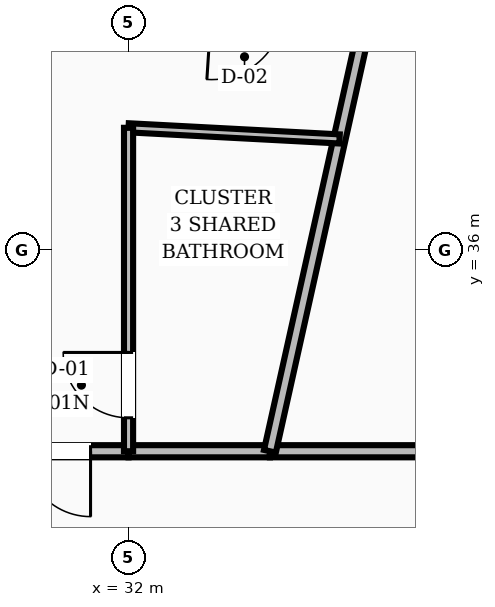
"""IFC4 building model, lengths in metres.
Left out: names, types, materials, properties, quantities, classifications, styles, units other than length and angle.
Written with IfcOpenShell. Run it as: python <this file> out.ifc"""

import sys

from ifc_helpers import new_model, si_unit, direction, frame, frame_2d, origin, place, context, subcontext, project, spatial, rectangle, extrude, element, fill, save


model = new_model("IFC4")
c1 = context("Model", 3, precision=1e-05, world=origin(), true_north=direction((0.0, 1.0)))
c2 = subcontext(c1, "Body", "Model", "MODEL_VIEW")
j1 = project(units=[si_unit("LENGTHUNIT", "METRE"), si_unit("PLANEANGLEUNIT", "RADIAN")], contexts=[c1])
p1 = place(None, origin())
s1 = spatial("IfcSite", under=j1, at=p1, CompositionType="ELEMENT")
p2 = place(p1, origin())
s2 = spatial("IfcBuilding", under=s1, at=p2, CompositionType="ELEMENT")
p3 = place(p2, frame((0.0, 0.0, 229.2)))
s3 = spatial("IfcBuildingStorey", under=s2, at=p3, CompositionType="ELEMENT", Elevation=229.2)
p4 = place(p3, frame((35.873, 33.35, 0.0), z_axis=(0.0, 0.0, 1.0), x_axis=(-1.0, 0.0, 0.0)))
e1 = element("IfcWall", 1, at=p4, inside=s3, PredefinedType="SOLIDWALL", context=c2, shape_type="SweptSolid", body=[
    extrude(rectangle(XDim=2.013, YDim=0.16, at=frame_2d((1.006, 0.0))), origin(), (0.0, 0.0, 1.0), 2.87),
])
p5 = place(p3, frame((33.86, 33.35, 0.0), z_axis=(0.0, 0.0, 1.0), x_axis=(-1.0, 0.0, 0.0)))
e2 = element("IfcWall", 2, at=p5, inside=s3, PredefinedType="SOLIDWALL", context=c2, shape_type="SweptSolid", body=[
    extrude(rectangle(XDim=1.86, YDim=0.16, at=frame_2d((0.93, 0.0))), origin(), (0.0, 0.0, 1.0), 2.87),
])
p6 = place(p3, frame((32.0, 33.35, 0.0), z_axis=(0.0, 0.0, 1.0), x_axis=(-1.0, 0.0, 0.0)))
e3 = element("IfcWall", 3, at=p6, inside=s3, PredefinedType="SOLIDWALL", context=c2, shape_type="SweptSolid", body=[
    extrude(rectangle(XDim=1.86, YDim=0.16, at=frame_2d((0.93, 0.0))), origin(), (0.0, 0.0, 1.0), 2.87),
])
p7 = place(p6, frame((0.5, 0.0, 0.0)))
e4 = element("IfcOpeningElement", 4, at=p7, cuts=e3, PredefinedType="OPENING", context=c2, shape_type="SweptSolid", body=[
    extrude(rectangle(XDim=0.86, YDim=2.1, at=frame_2d((0.43, 1.05))), frame((0.0, 0.09, 0.0), z_axis=(0.0, -1.0, 0.0), x_axis=(1.0, 0.0, 0.0)), (0.0, 0.0, 1.0), 0.18),
])
p8 = place(p3, frame((38.256, 38.454, 0.0), z_axis=(0.0, 0.0, 1.0), x_axis=(-0.981903403817, 0.189382432059, 0.0)))
e5 = element("IfcWall", 5, at=p8, inside=s3, PredefinedType="PARTITIONING", context=c2, shape_type="SweptSolid", body=[
    extrude(rectangle(XDim=3.182, YDim=0.12, at=frame_2d((1.591, 0.0))), origin(), (0.0, 0.0, 1.0), 2.87),
])
p9 = place(p8, frame((1.116, 0.0, 0.0)))
e6 = element("IfcOpeningElement", 6, at=p9, cuts=e5, PredefinedType="OPENING", context=c2, shape_type="SweptSolid", body=[
    extrude(rectangle(XDim=0.95, YDim=2.1, at=frame_2d((0.475, 1.05))), frame((0.0, 0.07, 0.0), z_axis=(0.0, -1.0, 0.0), x_axis=(1.0, 0.0, 0.0)), (0.0, 0.0, 1.0), 0.14),
])
p10 = place(p3, frame((33.86, 33.35, 0.0), z_axis=(0.0, 0.0, 1.0), x_axis=(0.217565376415, 0.976045750457, 0.0)))
e7 = element("IfcWall", 7, at=p10, inside=s3, PredefinedType="SOLIDWALL", context=c2, shape_type="SweptSolid", body=[
    extrude(rectangle(XDim=11.643, YDim=0.16, at=frame_2d((5.822, 0.0))), origin(), (0.0, 0.0, 1.0), 2.87),
])
p11 = place(p3, frame((34.776, 37.459, 0.0), z_axis=(0.0, 0.0, 1.0), x_axis=(-0.998614916088, 0.052614155575, 0.0)))
e8 = element("IfcWall", 8, at=p11, inside=s3, PredefinedType="PARTITIONING", context=c2, shape_type="SweptSolid", body=[
    extrude(rectangle(XDim=2.78, YDim=0.12, at=frame_2d((1.39, 0.0))), origin(), (0.0, 0.0, 1.0), 2.87),
])
p12 = place(p3, frame((32.0, 33.35, 0.0), z_axis=(0.0, 0.0, 1.0), x_axis=(0.0, 1.0, 0.0)))
e9 = element("IfcWall", 9, at=p12, inside=s3, PredefinedType="PARTITIONING", context=c2, shape_type="SweptSolid", body=[
    extrude(rectangle(XDim=4.255, YDim=0.12, at=frame_2d((2.127, 0.0))), origin(), (0.0, 0.0, 1.0), 2.87),
])
p13 = place(p12, frame((0.44, 0.0, 0.0)))
e10 = element("IfcOpeningElement", 10, at=p13, cuts=e9, PredefinedType="OPENING", context=c2, shape_type="SweptSolid", body=[
    extrude(rectangle(XDim=0.86, YDim=2.1, at=frame_2d((0.43, 1.05))), frame((0.0, 0.07, 0.0), z_axis=(0.0, -1.0, 0.0), x_axis=(1.0, 0.0, 0.0)), (0.0, 0.0, 1.0), 0.14),
])
p14 = place(p13, origin())
e11 = element("IfcDoor", 11, at=p14, inside=s3, OperationType="SINGLE_SWING_RIGHT", PredefinedType="DOOR", context=c2, shape_type="SweptSolid", body=[
    extrude(rectangle(XDim=0.86, YDim=2.1, at=frame_2d((0.43, 1.05))), frame((0.0, 0.025, 0.0), z_axis=(0.0, -1.0, 0.0), x_axis=(1.0, 0.0, 0.0)), (0.0, 0.0, 1.0), 0.05),
])
fill(e10, e11)
p15 = place(p7, origin())
e12 = element("IfcDoor", 12, at=p15, inside=s3, OperationType="SINGLE_SWING_LEFT", PredefinedType="DOOR", context=c2, shape_type="SweptSolid", body=[
    extrude(rectangle(XDim=0.86, YDim=2.1, at=frame_2d((0.43, 1.05))), frame((0.0, 0.025, 0.0), z_axis=(0.0, -1.0, 0.0), x_axis=(1.0, 0.0, 0.0)), (0.0, 0.0, 1.0), 0.05),
])
fill(e4, e12)
save(model, sys.argv[1])
